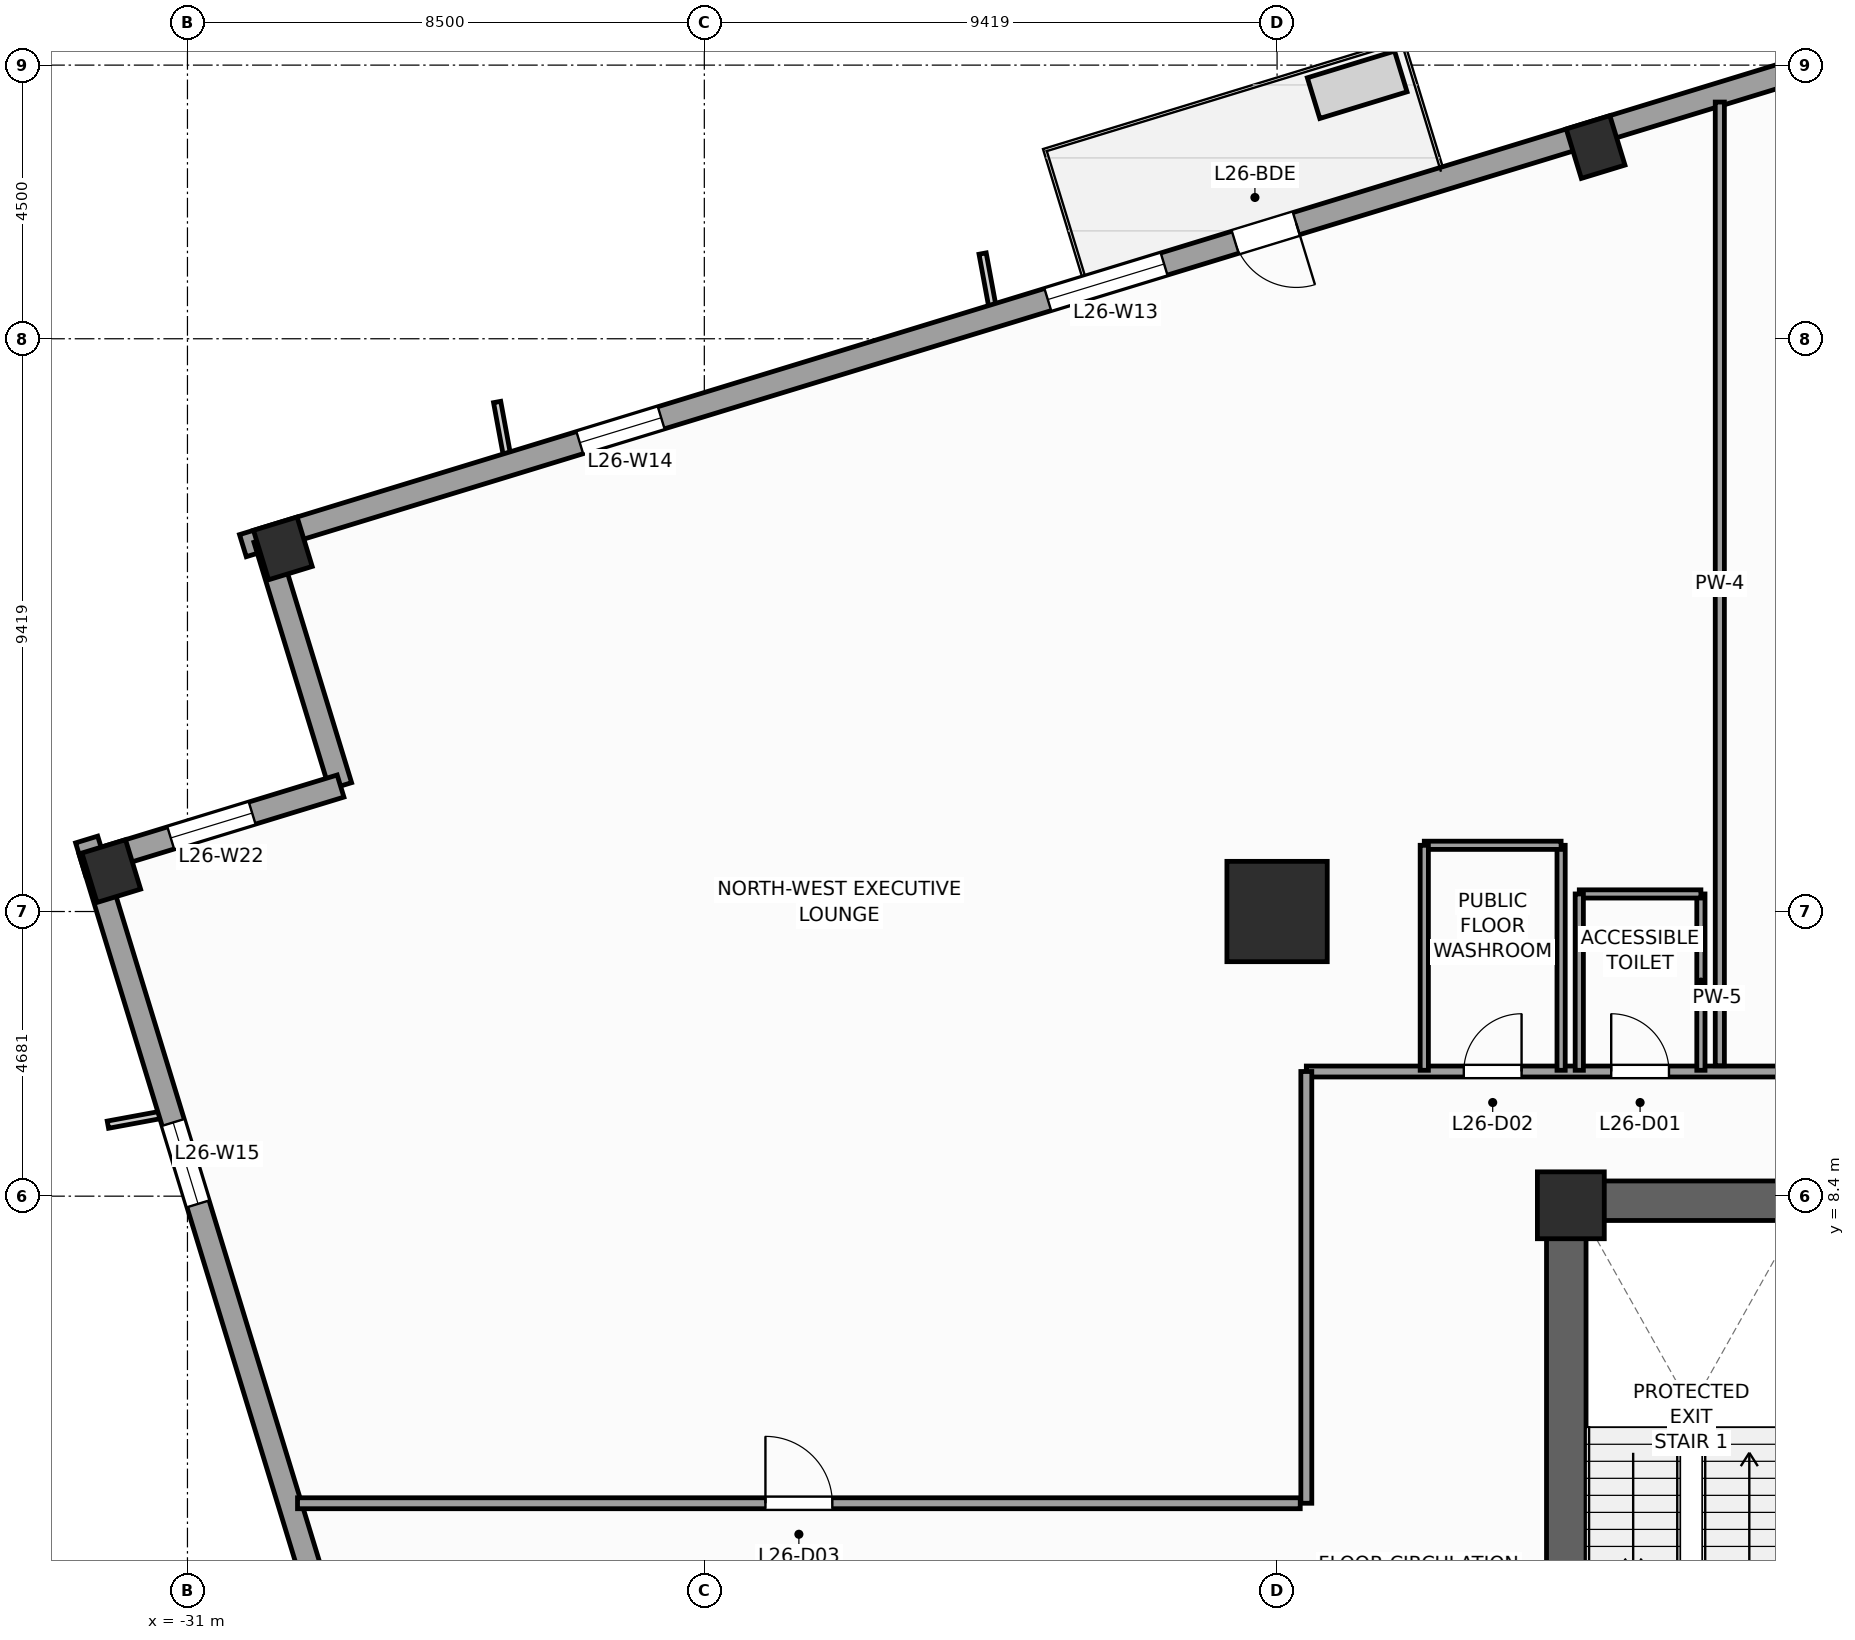
"""IFC4 building model, lengths in metres.
Left out: names, types, materials, properties, quantities, classifications, styles, units other than length and angle.
Written with IfcOpenShell. Run it as: python <this file> out.ifc"""

import sys

from ifc_helpers import new_model, si_unit, direction, frame, frame_2d, origin, origin_2d, place, context, subcontext, project, spatial, rectangle, extrude, source, transform, mapped, element, fill, save


model = new_model("IFC4")
c1 = context("Model", 3, precision=1e-05, world=origin(), true_north=direction((0.0, 1.0)))
c2 = subcontext(c1, "Body", "Model", "MODEL_VIEW")
j1 = project(units=[si_unit("LENGTHUNIT", "METRE"), si_unit("PLANEANGLEUNIT", "RADIAN")], contexts=[c1])
p1 = place(None, origin())
s1 = spatial("IfcSite", under=j1, at=p1, CompositionType="ELEMENT")
p2 = place(p1, origin())
s2 = spatial("IfcBuilding", under=s1, at=p2, CompositionType="ELEMENT")
p3 = place(p2, frame((0.0, 0.0, 111.2)))
s3 = spatial("IfcBuildingStorey", under=s2, at=p3, CompositionType="ELEMENT", Elevation=111.2)
p4 = place(p3, frame((-8.65, 8.325, 0.0), z_axis=(0.0, 0.0, 1.0), x_axis=(1.0, 0.0, 0.0)))
e1 = element("IfcWall", 1, at=p4, inside=s3, PredefinedType="SHEAR", context=c2, shape_type="SweptSolid", body=[
    extrude(rectangle(XDim=17.3, YDim=0.65, at=frame_2d((8.65, 0.0))), origin(), (0.0, 0.0, 1.0), 4.0),
])
p5 = place(p3, frame((-8.325, -8.0, 0.0), z_axis=(0.0, 0.0, 1.0), x_axis=(0.0, 1.0, 0.0)))
e2 = element("IfcWall", 2, at=p5, inside=s3, PredefinedType="SHEAR", context=c2, shape_type="SweptSolid", body=[
    extrude(rectangle(XDim=16.0, YDim=0.65, at=frame_2d((8.0, 0.0))), origin(), (0.0, 0.0, 1.0), 4.0),
])
p6 = place(p5, frame((4.69, 0.0, 0.0)))
e3 = element("IfcOpeningElement", 3, at=p6, cuts=e2, PredefinedType="OPENING", context=c2, shape_type="SweptSolid", body=[
    extrude(rectangle(XDim=1.3, YDim=2.2, at=frame_2d((0.65, 1.1))), frame((0.0, 0.335, 0.0), z_axis=(0.0, -1.0, 0.0), x_axis=(1.0, 0.0, 0.0)), (0.0, 0.0, 1.0), 0.67),
])
m1 = source(origin(), c2, "Body", "SweptSolid", [
    extrude(rectangle(XDim=1.1, YDim=1.1, at=origin_2d()), origin(), (0.0, 0.0, 1.0), 4.0),
])
p7 = place(p3, frame((-8.25, 8.25, 0.0), z_axis=(0.0, 0.0, 1.0), x_axis=(1.0, 0.0, 0.0)))
e4 = element("IfcColumn", 4, at=p7, inside=s3, PredefinedType="PILASTER", context=c2, shape_type="MappedRepresentation", body=[
    mapped(m1, transform((0.0, 0.0, 0.0), scale=1.0)),
])
m2 = source(origin(), c2, "Body", "SweptSolid", [
    extrude(rectangle(XDim=1.65, YDim=1.65, at=origin_2d()), origin(), (0.0, 0.0, 1.0), 4.0),
])
p8 = place(p3, frame((-13.081, 13.081, 0.0), z_axis=(0.0, 0.0, 1.0), x_axis=(1.0, 0.0, 0.0)))
e5 = element("IfcColumn", 5, at=p8, inside=s3, PredefinedType="COLUMN", context=c2, shape_type="MappedRepresentation", body=[
    mapped(m2, transform((0.0, 0.0, 0.0), scale=1.0)),
])
m3 = source(origin(), c2, "Body", "SweptSolid", [
    extrude(rectangle(XDim=0.75, YDim=0.85, at=origin_2d()), origin(), (0.0, 0.0, 1.0), 4.0),
])
for number, where, z_axis, x_axis in (
    (6, (-7.843, 25.653, 0.0), (0.0, 0.0, 1.0), (0.956, 0.292, 0.0)),
    (7, (-29.431, 19.052, 0.0), (0.0, 0.0, 1.0), (0.956, 0.292, 0.0)),
    (8, (-32.253, 13.746, 0.0), (0.0, 0.0, 1.0), (0.956, 0.292, 0.0)),
):
    element("IfcColumn", number, at=place(p3, frame(where, z_axis=z_axis, x_axis=x_axis)), inside=s3, PredefinedType="COLUMN", context=c2, shape_type="MappedRepresentation", body=[
        mapped(m3, transform((0.0, 0.0, 0.0), scale=1.0)),
    ])
p9 = place(p3, frame((14.265, 32.658, 0.0), z_axis=(0.0, 0.0, 1.0), x_axis=(-0.956304320851, -0.292373127906, 0.0)))
e9 = element("IfcWall", 9, at=p9, inside=s3, PredefinedType="STANDARD", context=c2, shape_type="SweptSolid", body=[
    extrude(rectangle(XDim=46.38, YDim=0.38, at=frame_2d((23.19, 0.0))), origin(), (0.0, 0.0, 1.0), 3.14),
])
p10 = place(p9, frame((28.265, 0.0, 0.0)))
e10 = element("IfcOpeningElement", 10, at=p10, cuts=e9, PredefinedType="OPENING", context=c2, shape_type="SweptSolid", body=[
    extrude(rectangle(XDim=1.05, YDim=2.25, at=frame_2d((0.525, 1.125))), frame((0.0, 0.2, 0.0), z_axis=(0.0, -1.0, 0.0), x_axis=(1.0, 0.0, 0.0)), (0.0, 0.0, 1.0), 0.4),
])
p11 = place(p9, frame((4.865, 0.0, 0.51)))
e11 = element("IfcOpeningElement", 11, at=p11, cuts=e9, PredefinedType="OPENING", context=c2, shape_type="SweptSolid", body=[
    extrude(rectangle(XDim=1.4, YDim=2.4, at=frame_2d((0.7, 1.2))), frame((0.0, 0.2, 0.0), z_axis=(0.0, -1.0, 0.0), x_axis=(1.0, 0.0, 0.0)), (0.0, 0.0, 1.0), 0.4),
])
p12 = place(p9, frame((12.45, 0.0, 0.51)))
e12 = element("IfcOpeningElement", 12, at=p12, cuts=e9, PredefinedType="OPENING", context=c2, shape_type="SweptSolid", body=[
    extrude(rectangle(XDim=2.0, YDim=2.4, at=frame_2d((1.0, 1.2))), frame((0.0, 0.2, 0.0), z_axis=(0.0, -1.0, 0.0), x_axis=(1.0, 0.0, 0.0)), (0.0, 0.0, 1.0), 0.4),
])
p13 = place(p9, frame((30.538, 0.0, 0.51)))
e13 = element("IfcOpeningElement", 13, at=p13, cuts=e9, PredefinedType="OPENING", context=c2, shape_type="SweptSolid", body=[
    extrude(rectangle(XDim=2.0, YDim=2.4, at=frame_2d((1.0, 1.2))), frame((0.0, 0.2, 0.0), z_axis=(0.0, -1.0, 0.0), x_axis=(1.0, 0.0, 0.0)), (0.0, 0.0, 1.0), 0.4),
])
p14 = place(p9, frame((39.187, 0.0, 0.51)))
e14 = element("IfcOpeningElement", 14, at=p14, cuts=e9, PredefinedType="OPENING", context=c2, shape_type="SweptSolid", body=[
    extrude(rectangle(XDim=1.4, YDim=2.4, at=frame_2d((0.7, 1.2))), frame((0.0, 0.2, 0.0), z_axis=(0.0, -1.0, 0.0), x_axis=(1.0, 0.0, 0.0)), (0.0, 0.0, 1.0), 0.4),
])
p15 = place(p3, frame((-29.725, 19.208, 0.0), z_axis=(0.0, 0.0, 1.0), x_axis=(0.292345507338, -0.956312764915, 0.0)))
e15 = element("IfcWall", 15, at=p15, inside=s3, PredefinedType="STANDARD", context=c2, shape_type="SweptSolid", body=[
    extrude(rectangle(XDim=4.25, YDim=0.38, at=frame_2d((2.125, 0.0))), origin(), (0.0, 0.0, 1.0), 3.74),
])
p16 = place(p3, frame((-28.482, 15.144, 0.0), z_axis=(0.0, 0.0, 1.0), x_axis=(-0.956304176051, -0.292373601522, 0.0)))
e16 = element("IfcWall", 16, at=p16, inside=s3, PredefinedType="STANDARD", context=c2, shape_type="SweptSolid", body=[
    extrude(rectangle(XDim=4.44, YDim=0.38, at=frame_2d((2.22, 0.0))), origin(), (0.0, 0.0, 1.0), 3.04),
])
p17 = place(p16, frame((1.52, 0.0, 0.51)))
e17 = element("IfcOpeningElement", 17, at=p17, cuts=e16, PredefinedType="OPENING", context=c2, shape_type="SweptSolid", body=[
    extrude(rectangle(XDim=1.4, YDim=2.4, at=frame_2d((0.7, 1.2))), frame((0.0, 0.2, 0.0), z_axis=(0.0, -1.0, 0.0), x_axis=(1.0, 0.0, 0.0)), (0.0, 0.0, 1.0), 0.4),
])
p18 = place(p3, frame((-32.658, 14.265, 0.0), z_axis=(0.0, 0.0, 1.0), x_axis=(0.292373127906, -0.956304320851, 0.0)))
e18 = element("IfcWall", 18, at=p18, inside=s3, PredefinedType="STANDARD", context=c2, shape_type="SweptSolid", body=[
    extrude(rectangle(XDim=46.38, YDim=0.38, at=frame_2d((23.19, 0.0))), origin(), (0.0, 0.0, 1.0), 3.14),
])
p19 = place(p18, frame((4.865, 0.0, 0.51)))
e19 = element("IfcOpeningElement", 19, at=p19, cuts=e18, PredefinedType="OPENING", context=c2, shape_type="SweptSolid", body=[
    extrude(rectangle(XDim=1.4, YDim=2.4, at=frame_2d((0.7, 1.2))), frame((0.0, 0.2, 0.0), z_axis=(0.0, -1.0, 0.0), x_axis=(1.0, 0.0, 0.0)), (0.0, 0.0, 1.0), 0.4),
])
p20 = place(p18, frame((14.7, 0.0, 0.51)))
e20 = element("IfcOpeningElement", 20, at=p20, cuts=e18, PredefinedType="OPENING", context=c2, shape_type="SweptSolid", body=[
    extrude(rectangle(XDim=2.0, YDim=2.4, at=frame_2d((1.0, 1.2))), frame((0.0, 0.2, 0.0), z_axis=(0.0, -1.0, 0.0), x_axis=(1.0, 0.0, 0.0)), (0.0, 0.0, 1.0), 0.4),
])
p21 = place(p18, frame((19.012, 0.0, 0.51)))
e21 = element("IfcOpeningElement", 21, at=p21, cuts=e18, PredefinedType="OPENING", context=c2, shape_type="SweptSolid", body=[
    extrude(rectangle(XDim=2.0, YDim=2.4, at=frame_2d((1.0, 1.2))), frame((0.0, 0.2, 0.0), z_axis=(0.0, -1.0, 0.0), x_axis=(1.0, 0.0, 0.0)), (0.0, 0.0, 1.0), 0.4),
])
p22 = place(p18, frame((30.538, 0.0, 0.51)))
e22 = element("IfcOpeningElement", 22, at=p22, cuts=e18, PredefinedType="OPENING", context=c2, shape_type="SweptSolid", body=[
    extrude(rectangle(XDim=2.0, YDim=2.4, at=frame_2d((1.0, 1.2))), frame((0.0, 0.2, 0.0), z_axis=(0.0, -1.0, 0.0), x_axis=(1.0, 0.0, 0.0)), (0.0, 0.0, 1.0), 0.4),
])
p23 = place(p18, frame((39.187, 0.0, 0.51)))
e23 = element("IfcOpeningElement", 23, at=p23, cuts=e18, PredefinedType="OPENING", context=c2, shape_type="SweptSolid", body=[
    extrude(rectangle(XDim=1.4, YDim=2.4, at=frame_2d((0.7, 1.2))), frame((0.0, 0.2, 0.0), z_axis=(0.0, -1.0, 0.0), x_axis=(1.0, 0.0, 0.0)), (0.0, 0.0, 1.0), 0.4),
])
p24 = place(p3, frame((-12.6, 10.45, 0.0), z_axis=(0.0, 0.0, 1.0), x_axis=(1.0, 0.0, 0.0)))
e24 = element("IfcWall", 24, at=p24, inside=s3, PredefinedType="PARTITIONING", context=c2, shape_type="SweptSolid", body=[
    extrude(rectangle(XDim=25.2, YDim=0.18, at=frame_2d((12.6, 0.0))), origin(), (0.0, 0.0, 1.0), 3.74),
])
p25 = place(p24, frame((5.014, 0.0, 0.0)))
e25 = element("IfcOpeningElement", 25, at=p25, cuts=e24, PredefinedType="OPENING", context=c2, shape_type="SweptSolid", body=[
    extrude(rectangle(XDim=0.95, YDim=2.1, at=frame_2d((0.475, 1.05))), frame((0.0, 0.1, 0.0), z_axis=(0.0, -1.0, 0.0), x_axis=(1.0, 0.0, 0.0)), (0.0, 0.0, 1.0), 0.2),
])
p26 = place(p24, frame((2.59, 0.0, 0.0)))
e26 = element("IfcOpeningElement", 26, at=p26, cuts=e24, PredefinedType="OPENING", context=c2, shape_type="SweptSolid", body=[
    extrude(rectangle(XDim=0.95, YDim=2.1, at=frame_2d((0.475, 1.05))), frame((0.0, 0.1, 0.0), z_axis=(0.0, -1.0, 0.0), x_axis=(1.0, 0.0, 0.0)), (0.0, 0.0, 1.0), 0.2),
])
p27 = place(p24, frame((12.05, 0.0, 0.0)))
e27 = element("IfcOpeningElement", 27, at=p27, cuts=e24, PredefinedType="OPENING", context=c2, shape_type="SweptSolid", body=[
    extrude(rectangle(XDim=1.1, YDim=2.2, at=frame_2d((0.55, 1.1))), frame((0.0, 0.1, 0.0), z_axis=(0.0, -1.0, 0.0), x_axis=(1.0, 0.0, 0.0)), (0.0, 0.0, 1.0), 0.2),
])
p28 = place(p3, frame((-12.6, 3.35, 0.0), z_axis=(0.0, 0.0, 1.0), x_axis=(0.0, 1.0, 0.0)))
e28 = element("IfcWall", 28, at=p28, inside=s3, PredefinedType="PARTITIONING", context=c2, shape_type="SweptSolid", body=[
    extrude(rectangle(XDim=7.1, YDim=0.18, at=frame_2d((3.55, 0.0))), origin(), (0.0, 0.0, 1.0), 3.74),
])
p29 = place(p3, frame((-29.19, 3.35, 0.0), z_axis=(0.0, 0.0, 1.0), x_axis=(1.0, 0.0, 0.0)))
e29 = element("IfcWall", 29, at=p29, inside=s3, PredefinedType="PARTITIONING", context=c2, shape_type="SweptSolid", body=[
    extrude(rectangle(XDim=16.49, YDim=0.18, at=frame_2d((8.245, 0.0))), origin(), (0.0, 0.0, 1.0), 3.74),
])
p30 = place(p29, frame((7.695, 0.0, 0.0)))
e30 = element("IfcOpeningElement", 30, at=p30, cuts=e29, PredefinedType="OPENING", context=c2, shape_type="SweptSolid", body=[
    extrude(rectangle(XDim=1.1, YDim=2.2, at=frame_2d((0.55, 1.1))), frame((0.0, 0.1, 0.0), z_axis=(0.0, -1.0, 0.0), x_axis=(1.0, 0.0, 0.0)), (0.0, 0.0, 1.0), 0.2),
])
p31 = place(p3, frame((-5.8, 10.545, 0.0), z_axis=(0.0, 0.0, 1.0), x_axis=(0.0, 1.0, 0.0)))
e31 = element("IfcWall", 31, at=p31, inside=s3, PredefinedType="PARTITIONING", context=c2, shape_type="SweptSolid", body=[
    extrude(rectangle(XDim=15.848, YDim=0.15, at=frame_2d((7.924, 0.0))), origin(), (0.0, 0.0, 1.0), 3.74),
])
p32 = place(p3, frame((-6.111, 10.47, 0.0), z_axis=(0.0, 0.0, 1.0), x_axis=(0.0, 1.0, 0.0)))
e32 = element("IfcWall", 32, at=p32, inside=s3, PredefinedType="PARTITIONING", context=c2, shape_type="SweptSolid", body=[
    extrude(rectangle(XDim=2.9, YDim=0.135, at=frame_2d((1.45, 0.0))), origin(), (0.0, 0.0, 1.0), 3.74),
])
p33 = place(p3, frame((-8.111, 13.37, 0.0), z_axis=(0.0, 0.0, 1.0), x_axis=(1.0, 0.0, 0.0)))
e33 = element("IfcWall", 33, at=p33, inside=s3, PredefinedType="PARTITIONING", context=c2, shape_type="SweptSolid", body=[
    extrude(rectangle(XDim=2.0, YDim=0.135, at=frame_2d((1.0, 0.0))), origin(), (0.0, 0.0, 1.0), 2.732),
])
p34 = place(p3, frame((-8.111, 10.47, 0.0), z_axis=(0.0, 0.0, 1.0), x_axis=(0.0, 1.0, 0.0)))
e34 = element("IfcWall", 34, at=p34, inside=s3, PredefinedType="PARTITIONING", context=c2, shape_type="SweptSolid", body=[
    extrude(rectangle(XDim=2.9, YDim=0.135, at=frame_2d((1.45, 0.0))), origin(), (0.0, 0.0, 1.0), 3.74),
])
p35 = place(p3, frame((-8.41, 10.47, 0.0), z_axis=(0.0, 0.0, 1.0), x_axis=(0.0, 1.0, 0.0)))
e35 = element("IfcWall", 35, at=p35, inside=s3, PredefinedType="PARTITIONING", context=c2, shape_type="SweptSolid", body=[
    extrude(rectangle(XDim=3.7, YDim=0.135, at=frame_2d((1.85, 0.0))), origin(), (0.0, 0.0, 1.0), 3.74),
])
p36 = place(p3, frame((-10.66, 14.17, 0.0), z_axis=(0.0, 0.0, 1.0), x_axis=(1.0, 0.0, 0.0)))
e36 = element("IfcWall", 36, at=p36, inside=s3, PredefinedType="PARTITIONING", context=c2, shape_type="SweptSolid", body=[
    extrude(rectangle(XDim=2.25, YDim=0.135, at=frame_2d((1.125, 0.0))), origin(), (0.0, 0.0, 1.0), 3.74),
])
p37 = place(p3, frame((-10.66, 10.47, 0.0), z_axis=(0.0, 0.0, 1.0), x_axis=(0.0, 1.0, 0.0)))
e37 = element("IfcWall", 37, at=p37, inside=s3, PredefinedType="PARTITIONING", context=c2, shape_type="SweptSolid", body=[
    extrude(rectangle(XDim=3.7, YDim=0.135, at=frame_2d((1.85, 0.0))), origin(), (0.0, 0.0, 1.0), 3.74),
])
m4 = source(origin(), c2, "Body", "SweptSolid", [
    extrude(rectangle(XDim=1.05, YDim=2.25, at=frame_2d((0.525, 1.125))), frame((0.0, 0.025, 0.0), z_axis=(0.0, -1.0, 0.0), x_axis=(1.0, 0.0, 0.0)), (0.0, 0.0, 1.0), 0.05),
])
p38 = place(p10, origin())
e38 = element("IfcDoor", 38, at=p38, inside=s3, OperationType="SINGLE_SWING_LEFT", PredefinedType="DOOR", context=c2, shape_type="MappedRepresentation", body=[
    mapped(m4, transform((0.0, 0.0, 0.0), scale=1.0)),
])
fill(e10, e38)
m5 = source(origin(), c2, "Body", "SweptSolid", [
    extrude(rectangle(XDim=2.0, YDim=2.4, at=frame_2d((1.0, 1.2))), frame((0.0, 0.03, 0.0), z_axis=(0.0, -1.0, 0.0), x_axis=(1.0, 0.0, 0.0)), (0.0, 0.0, 1.0), 0.06),
])
p39 = place(p13, origin())
e39 = element("IfcWindow", 39, at=p39, inside=s3, PartitioningType="SINGLE_PANEL", PredefinedType="WINDOW", context=c2, shape_type="MappedRepresentation", body=[
    mapped(m5, transform((0.0, 0.0, 0.0), scale=1.0)),
])
fill(e13, e39)
m6 = source(origin(), c2, "Body", "SweptSolid", [
    extrude(rectangle(XDim=1.4, YDim=2.4, at=frame_2d((0.7, 1.2))), frame((0.0, 0.03, 0.0), z_axis=(0.0, -1.0, 0.0), x_axis=(1.0, 0.0, 0.0)), (0.0, 0.0, 1.0), 0.06),
])
p40 = place(p14, origin())
e40 = element("IfcWindow", 40, at=p40, inside=s3, PartitioningType="SINGLE_PANEL", PredefinedType="WINDOW", context=c2, shape_type="MappedRepresentation", body=[
    mapped(m6, transform((0.0, 0.0, 0.0), scale=1.0)),
])
fill(e14, e40)
p41 = place(p19, origin())
e41 = element("IfcWindow", 41, at=p41, inside=s3, PartitioningType="SINGLE_PANEL", PredefinedType="WINDOW", context=c2, shape_type="MappedRepresentation", body=[
    mapped(m6, transform((0.0, 0.0, 0.0), scale=1.0)),
])
fill(e19, e41)
p42 = place(p17, origin())
e42 = element("IfcWindow", 42, at=p42, inside=s3, PartitioningType="SINGLE_PANEL", PredefinedType="WINDOW", context=c2, shape_type="MappedRepresentation", body=[
    mapped(m6, transform((0.0, 0.0, 0.0), scale=1.0)),
])
fill(e17, e42)
m7 = source(origin(), c2, "Body", "SweptSolid", [
    extrude(rectangle(XDim=0.95, YDim=2.1, at=frame_2d((0.475, 1.05))), frame((0.0, 0.025, 0.0), z_axis=(0.0, -1.0, 0.0), x_axis=(1.0, 0.0, 0.0)), (0.0, 0.0, 1.0), 0.05),
])
p43 = place(p25, origin())
e43 = element("IfcDoor", 43, at=p43, inside=s3, OperationType="SINGLE_SWING_LEFT", PredefinedType="DOOR", context=c2, shape_type="MappedRepresentation", body=[
    mapped(m7, transform((0.0, 0.0, 0.0), scale=1.0)),
])
fill(e25, e43)
p44 = place(p26, origin())
e44 = element("IfcDoor", 44, at=p44, inside=s3, OperationType="SINGLE_SWING_RIGHT", PredefinedType="DOOR", context=c2, shape_type="MappedRepresentation", body=[
    mapped(m7, transform((0.0, 0.0, 0.0), scale=1.0)),
])
fill(e26, e44)
m8 = source(origin(), c2, "Body", "SweptSolid", [
    extrude(rectangle(XDim=1.1, YDim=2.2, at=frame_2d((0.55, 1.1))), frame((0.0, 0.025, 0.0), z_axis=(0.0, -1.0, 0.0), x_axis=(1.0, 0.0, 0.0)), (0.0, 0.0, 1.0), 0.05),
])
p45 = place(p30, origin())
e45 = element("IfcDoor", 45, at=p45, inside=s3, OperationType="SINGLE_SWING_LEFT", PredefinedType="DOOR", context=c2, shape_type="MappedRepresentation", body=[
    mapped(m8, transform((0.0, 0.0, 0.0), scale=1.0)),
])
fill(e30, e45)
save(model, sys.argv[1])
